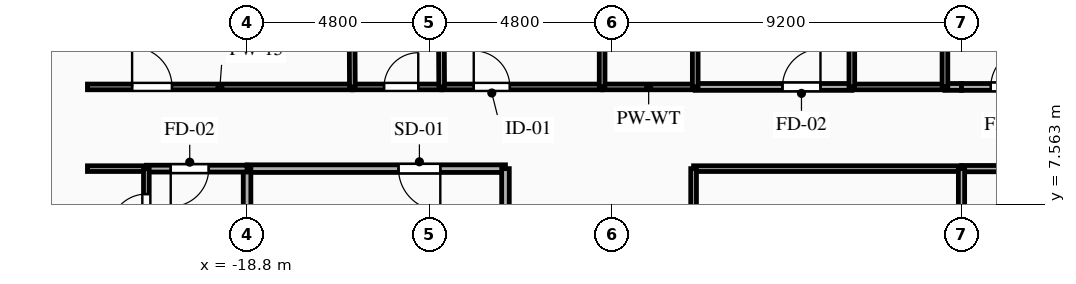
"""IFC4 building model, lengths in metres.
Left out: names, types, materials, properties, quantities, classifications, styles, units other than length and angle.
Written with IfcOpenShell. Run it as: python <this file> out.ifc"""

import sys

from ifc_helpers import new_model, si_unit, direction, frame, frame_2d, origin, place, context, subcontext, project, spatial, rectangle, extrude, element, fill, save


model = new_model("IFC4")
c1 = context("Model", 3, precision=1e-05, world=origin(), true_north=direction((0.0, 1.0)))
c2 = subcontext(c1, "Body", "Model", "MODEL_VIEW")
j1 = project(units=[si_unit("LENGTHUNIT", "METRE"), si_unit("PLANEANGLEUNIT", "RADIAN")], contexts=[c1])
p1 = place(None, origin())
s1 = spatial("IfcSite", under=j1, at=p1, CompositionType="ELEMENT")
p2 = place(p1, origin())
s2 = spatial("IfcBuilding", under=s1, at=p2, CompositionType="ELEMENT")
p3 = place(p2, frame((0.0, 0.0, 82.35)))
s3 = spatial("IfcBuildingStorey", under=s2, at=p3, CompositionType="ELEMENT", Elevation=82.35)
p4 = place(p3, frame((-12.0, 8.5, 0.0), z_axis=(0.0, 0.0, 1.0), x_axis=(-1.0, 0.0, 0.0)))
e1 = element("IfcWall", 1, at=p4, inside=s3, PredefinedType="PARTITIONING", context=c2, shape_type="SweptSolid", body=[
    extrude(rectangle(XDim=6.8, YDim=0.2, at=frame_2d((3.4, 0.0))), origin(), (0.0, 0.0, 1.0), 3.045),
])
p5 = place(p4, frame((1.715, 0.0, 0.0)))
e2 = element("IfcOpeningElement", 2, at=p5, cuts=e1, PredefinedType="OPENING", context=c2, shape_type="SweptSolid", body=[
    extrude(rectangle(XDim=1.1, YDim=2.15, at=frame_2d((0.55, 1.075))), frame((0.0, 0.11, 0.0), z_axis=(0.0, -1.0, 0.0), x_axis=(1.0, 0.0, 0.0)), (0.0, 0.0, 1.0), 0.22),
])
p6 = place(p3, frame((-12.0, 5.6, 0.0), z_axis=(0.0, 0.0, 1.0), x_axis=(0.0, 1.0, 0.0)))
e3 = element("IfcWall", 3, at=p6, inside=s3, PredefinedType="PARTITIONING", context=c2, shape_type="SweptSolid", body=[
    extrude(rectangle(XDim=2.9, YDim=0.2, at=frame_2d((1.45, 0.0))), origin(), (0.0, 0.0, 1.0), 3.045),
])
p7 = place(p3, frame((-18.8, 8.5, 0.0), z_axis=(0.0, 0.0, 1.0), x_axis=(0.0, -1.0, 0.0)))
e4 = element("IfcWall", 4, at=p7, inside=s3, PredefinedType="PARTITIONING", context=c2, shape_type="SweptSolid", body=[
    extrude(rectangle(XDim=2.9, YDim=0.2, at=frame_2d((1.45, 0.0))), origin(), (0.0, 0.0, 1.0), 2.53),
])
p8 = place(p3, frame((-18.8, 8.5, 0.0), z_axis=(0.0, 0.0, 1.0), x_axis=(-1.0, 0.0, 0.0)))
e5 = element("IfcWall", 5, at=p8, inside=s3, PredefinedType="PARTITIONING", context=c2, shape_type="SweptSolid", body=[
    extrude(rectangle(XDim=2.65, YDim=0.18, at=frame_2d((1.325, 0.0))), origin(), (0.0, 0.0, 1.0), 3.045),
])
p9 = place(p8, frame((1.009, 0.0, 0.0)))
e6 = element("IfcOpeningElement", 6, at=p9, cuts=e5, PredefinedType="OPENING", context=c2, shape_type="SweptSolid", body=[
    extrude(rectangle(XDim=1.0, YDim=2.15, at=frame_2d((0.5, 1.075))), frame((0.0, 0.1, 0.0), z_axis=(0.0, -1.0, 0.0), x_axis=(1.0, 0.0, 0.0)), (0.0, 0.0, 1.0), 0.2),
])
p10 = place(p3, frame((-21.45, 8.5, 0.0), z_axis=(0.0, 0.0, 1.0), x_axis=(-1.0, 0.0, 0.0)))
e7 = element("IfcWall", 7, at=p10, inside=s3, PredefinedType="PARTITIONING", context=c2, shape_type="SweptSolid", body=[
    extrude(rectangle(XDim=1.55, YDim=0.15, at=frame_2d((0.775, 0.0))), origin(), (0.0, 0.0, 1.0), 3.045),
])
p11 = place(p3, frame((-23.0, 10.65, 0.0), z_axis=(0.0, 0.0, 1.0), x_axis=(1.0, 0.0, 0.0)))
e8 = element("IfcWall", 8, at=p11, inside=s3, PredefinedType="PARTITIONING", context=c2, shape_type="SweptSolid", body=[
    extrude(rectangle(XDim=6.971, YDim=0.15, at=frame_2d((3.485, 0.0))), origin(), (0.0, 0.0, 1.0), 3.045),
])
p12 = place(p11, frame((1.175, 0.0, 0.0)))
e9 = element("IfcOpeningElement", 9, at=p12, cuts=e8, PredefinedType="OPENING", context=c2, shape_type="SweptSolid", body=[
    extrude(rectangle(XDim=1.05, YDim=2.15, at=frame_2d((0.525, 1.075))), frame((0.0, 0.085, 0.0), z_axis=(0.0, -1.0, 0.0), x_axis=(1.0, 0.0, 0.0)), (0.0, 0.0, 1.0), 0.17),
])
p13 = place(p3, frame((-16.029, 10.65, 0.0), z_axis=(0.0, 0.0, 1.0), x_axis=(1.0, 0.0, 0.0)))
e10 = element("IfcWall", 10, at=p13, inside=s3, PredefinedType="PLUMBINGWALL", context=c2, shape_type="SweptSolid", body=[
    extrude(rectangle(XDim=2.35, YDim=0.15, at=frame_2d((1.175, 0.0))), origin(), (0.0, 0.0, 1.0), 3.045),
])
p14 = place(p13, frame((0.834, 0.0, 0.0)))
e11 = element("IfcOpeningElement", 11, at=p14, cuts=e10, PredefinedType="OPENING", context=c2, shape_type="SweptSolid", body=[
    extrude(rectangle(XDim=0.9, YDim=2.1, at=frame_2d((0.45, 1.05))), frame((0.0, 0.085, 0.0), z_axis=(0.0, -1.0, 0.0), x_axis=(1.0, 0.0, 0.0)), (0.0, 0.0, 1.0), 0.17),
])
p15 = place(p3, frame((-13.679, 10.65, 0.0), z_axis=(0.0, 0.0, 1.0), x_axis=(1.0, 0.0, 0.0)))
e12 = element("IfcWall", 12, at=p15, inside=s3, PredefinedType="PARTITIONING", context=c2, shape_type="SweptSolid", body=[
    extrude(rectangle(XDim=4.222, YDim=0.15, at=frame_2d((2.111, 0.0))), origin(), (0.0, 0.0, 1.0), 3.045),
])
p16 = place(p15, frame((0.844, 0.0, 0.0)))
e13 = element("IfcOpeningElement", 13, at=p16, cuts=e12, PredefinedType="OPENING", context=c2, shape_type="SweptSolid", body=[
    extrude(rectangle(XDim=0.95, YDim=2.1, at=frame_2d((0.475, 1.05))), frame((0.0, 0.085, 0.0), z_axis=(0.0, -1.0, 0.0), x_axis=(1.0, 0.0, 0.0)), (0.0, 0.0, 1.0), 0.17),
])
p17 = place(p3, frame((-7.007, 10.65, 0.0), z_axis=(0.0, 0.0, 1.0), x_axis=(1.0, 0.0, 0.0)))
e14 = element("IfcWall", 14, at=p17, inside=s3, PredefinedType="PARTITIONING", context=c2, shape_type="SweptSolid", body=[
    extrude(rectangle(XDim=4.121, YDim=0.18, at=frame_2d((2.061, 0.0))), origin(), (0.0, 0.0, 1.0), 3.045),
])
p18 = place(p17, frame((2.296, 0.0, 0.0)))
e15 = element("IfcOpeningElement", 15, at=p18, cuts=e14, PredefinedType="OPENING", context=c2, shape_type="SweptSolid", body=[
    extrude(rectangle(XDim=1.0, YDim=2.15, at=frame_2d((0.5, 1.075))), frame((0.0, 0.1, 0.0), z_axis=(0.0, -1.0, 0.0), x_axis=(1.0, 0.0, 0.0)), (0.0, 0.0, 1.0), 0.2),
])
p19 = place(p3, frame((-9.457, 10.65, 0.0), z_axis=(0.0, 0.0, 1.0), x_axis=(1.0, 0.0, 0.0)))
e16 = element("IfcWall", 16, at=p19, inside=s3, PredefinedType="PLUMBINGWALL", context=c2, shape_type="SweptSolid", body=[
    extrude(rectangle(XDim=2.45, YDim=0.15, at=frame_2d((1.225, 0.0))), origin(), (0.0, 0.0, 1.0), 3.045),
])
p20 = place(p3, frame((-0.436, 10.65, 0.0), z_axis=(0.0, 0.0, 1.0), x_axis=(1.0, 0.0, 0.0)))
e17 = element("IfcWall", 17, at=p20, inside=s3, PredefinedType="PARTITIONING", context=c2, shape_type="SweptSolid", body=[
    extrude(rectangle(XDim=0.436, YDim=0.18, at=frame_2d((0.218, 0.0))), origin(), (0.0, 0.0, 1.0), 3.045),
])
p21 = place(p3, frame((-2.886, 10.65, 0.0), z_axis=(0.0, 0.0, 1.0), x_axis=(1.0, 0.0, 0.0)))
e18 = element("IfcWall", 18, at=p21, inside=s3, PredefinedType="PLUMBINGWALL", context=c2, shape_type="SweptSolid", body=[
    extrude(rectangle(XDim=2.45, YDim=0.15, at=frame_2d((1.225, 0.0))), origin(), (0.0, 0.0, 1.0), 3.045),
])
p22 = place(p3, frame((0.0, 8.5, 0.0), z_axis=(0.0, 0.0, 1.0), x_axis=(-1.0, 0.0, 0.0)))
e19 = element("IfcWall", 19, at=p22, inside=s3, PredefinedType="PARTITIONING", context=c2, shape_type="SweptSolid", body=[
    extrude(rectangle(XDim=7.05, YDim=0.15, at=frame_2d((3.525, 0.0))), origin(), (0.0, 0.0, 1.0), 3.045),
])
p23 = place(p3, frame((0.0, 10.65, 0.0), z_axis=(0.0, 0.0, 1.0), x_axis=(1.0, 0.0, 0.0)))
e20 = element("IfcWall", 20, at=p23, inside=s3, PredefinedType="PARTITIONING", context=c2, shape_type="SweptSolid", body=[
    extrude(rectangle(XDim=3.686, YDim=0.18, at=frame_2d((1.843, 0.0))), origin(), (0.0, 0.0, 1.0), 3.045),
])
p24 = place(p23, frame((0.771, 0.0, 0.0)))
e21 = element("IfcOpeningElement", 21, at=p24, cuts=e20, PredefinedType="OPENING", context=c2, shape_type="SweptSolid", body=[
    extrude(rectangle(XDim=1.0, YDim=2.15, at=frame_2d((0.5, 1.075))), frame((0.0, 0.1, 0.0), z_axis=(0.0, -1.0, 0.0), x_axis=(1.0, 0.0, 0.0)), (0.0, 0.0, 1.0), 0.2),
])
p25 = place(p3, frame((7.05, 8.5, 0.0), z_axis=(0.0, 0.0, 1.0), x_axis=(-1.0, 0.0, 0.0)))
e22 = element("IfcWall", 22, at=p25, inside=s3, PredefinedType="PARTITIONING", context=c2, shape_type="SweptSolid", body=[
    extrude(rectangle(XDim=7.05, YDim=0.165, at=frame_2d((3.525, 0.0))), origin(), (0.0, 0.0, 1.0), 3.045),
])
p26 = place(p25, frame((4.728, 0.0, 0.0)))
e23 = element("IfcOpeningElement", 23, at=p26, cuts=e22, PredefinedType="OPENING", context=c2, shape_type="SweptSolid", body=[
    extrude(rectangle(XDim=1.15, YDim=2.15, at=frame_2d((0.575, 1.075))), frame((0.0, 0.093, 0.0), z_axis=(0.0, -1.0, 0.0), x_axis=(1.0, 0.0, 0.0)), (0.0, 0.0, 1.0), 0.185),
])
p27 = place(p3, frame((-7.05, 8.5, 0.0), z_axis=(0.0, 0.0, 1.0), x_axis=(0.0, -1.0, 0.0)))
e24 = element("IfcWall", 24, at=p27, inside=s3, PredefinedType="PARTITIONING", context=c2, shape_type="SweptSolid", body=[
    extrude(rectangle(XDim=14.1, YDim=0.15, at=frame_2d((7.05, 0.0))), origin(), (0.0, 0.0, 1.0), 3.045),
])
p28 = place(p27, frame((8.011, 0.0, 0.0)))
e25 = element("IfcOpeningElement", 25, at=p28, cuts=e24, PredefinedType="OPENING", context=c2, shape_type="SweptSolid", body=[
    extrude(rectangle(XDim=1.05, YDim=2.15, at=frame_2d((0.525, 1.075))), frame((0.0, 0.085, 0.0), z_axis=(0.0, -1.0, 0.0), x_axis=(1.0, 0.0, 0.0)), (0.0, 0.0, 1.0), 0.17),
])
p29 = place(p3, frame((-21.45, 5.68, 0.0), z_axis=(0.0, 0.0, 1.0), x_axis=(0.0, 1.0, 0.0)))
e26 = element("IfcWall", 26, at=p29, inside=s3, PredefinedType="PARTITIONING", context=c2, shape_type="SweptSolid", body=[
    extrude(rectangle(XDim=2.82, YDim=0.15, at=frame_2d((1.41, 0.0))), origin(), (0.0, 0.0, 1.0), 3.045),
])
p30 = place(p29, frame((1.201, 0.0, 0.0)))
e27 = element("IfcOpeningElement", 27, at=p30, cuts=e26, PredefinedType="OPENING", context=c2, shape_type="SweptSolid", body=[
    extrude(rectangle(XDim=0.95, YDim=2.1, at=frame_2d((0.475, 1.05))), frame((0.0, 0.085, 0.0), z_axis=(0.0, -1.0, 0.0), x_axis=(1.0, 0.0, 0.0)), (0.0, 0.0, 1.0), 0.17),
])
p31 = place(p3, frame((-16.073, 18.746, 0.0), z_axis=(0.0, 0.0, 1.0), x_axis=(0.005428146808, -0.999985267503, 0.0)))
e28 = element("IfcWall", 28, at=p31, inside=s3, PredefinedType="PLUMBINGWALL", context=c2, shape_type="SweptSolid", body=[
    extrude(rectangle(XDim=8.096, YDim=0.15, at=frame_2d((4.048, 0.0))), origin(), (0.0, 0.0, 1.0), 3.045),
])
p32 = place(p3, frame((-13.723, 18.992, 0.0), z_axis=(0.0, 0.0, 1.0), x_axis=(0.005267551513, -0.999986126354, 0.0)))
e29 = element("IfcWall", 29, at=p32, inside=s3, PredefinedType="PLUMBINGWALL", context=c2, shape_type="SweptSolid", body=[
    extrude(rectangle(XDim=8.343, YDim=0.15, at=frame_2d((4.171, 0.0))), origin(), (0.0, 0.0, 1.0), 3.045),
])
for number, where, z_axis, x_axis in (
    (30, (-9.457, 12.8, 0.0), (0.0, 0.0, 1.0), (0.0, -1.0, 0.0)),
    (31, (-7.007, 10.65, 0.0), (0.0, 0.0, 1.0), (0.0, 1.0, 0.0)),
    (32, (-2.886, 12.8, 0.0), (0.0, 0.0, 1.0), (0.0, -1.0, 0.0)),
    (33, (-0.436, 10.65, 0.0), (0.0, 0.0, 1.0), (0.0, 1.0, 0.0)),
):
    element("IfcWall", number, at=place(p3, frame(where, z_axis=z_axis, x_axis=x_axis)), inside=s3, PredefinedType="PLUMBINGWALL", context=c2, shape_type="SweptSolid", body=[
        extrude(rectangle(XDim=2.15, YDim=0.15, at=frame_2d((1.075, 0.0))), origin(), (0.0, 0.0, 1.0), 3.045),
    ])
p33 = place(p3, frame((0.0, 8.5, 0.0), z_axis=(0.0, 0.0, 1.0), x_axis=(0.0, -1.0, 0.0)))
e34 = element("IfcWall", 34, at=p33, inside=s3, PredefinedType="PARTITIONING", context=c2, shape_type="SweptSolid", body=[
    extrude(rectangle(XDim=7.05, YDim=0.165, at=frame_2d((3.525, 0.0))), origin(), (0.0, 0.0, 1.0), 3.045),
])
p34 = place(p5, origin())
e35 = element("IfcDoor", 35, at=p34, inside=s3, OperationType="SINGLE_SWING_LEFT", PredefinedType="DOOR", context=c2, shape_type="SweptSolid", body=[
    extrude(rectangle(XDim=1.1, YDim=2.15, at=frame_2d((0.55, 1.075))), frame((0.0, 0.025, 0.0), z_axis=(0.0, -1.0, 0.0), x_axis=(1.0, 0.0, 0.0)), (0.0, 0.0, 1.0), 0.05),
])
fill(e2, e35)
p35 = place(p9, origin())
e36 = element("IfcDoor", 36, at=p35, inside=s3, OperationType="SINGLE_SWING_RIGHT", PredefinedType="DOOR", context=c2, shape_type="SweptSolid", body=[
    extrude(rectangle(XDim=1.0, YDim=2.15, at=frame_2d((0.5, 1.075))), frame((0.0, 0.025, 0.0), z_axis=(0.0, -1.0, 0.0), x_axis=(1.0, 0.0, 0.0)), (0.0, 0.0, 1.0), 0.05),
])
fill(e6, e36)
p36 = place(p12, origin())
e37 = element("IfcDoor", 37, at=p36, inside=s3, OperationType="SINGLE_SWING_LEFT", PredefinedType="DOOR", context=c2, shape_type="SweptSolid", body=[
    extrude(rectangle(XDim=1.05, YDim=2.15, at=frame_2d((0.525, 1.075))), frame((0.0, 0.025, 0.0), z_axis=(0.0, -1.0, 0.0), x_axis=(1.0, 0.0, 0.0)), (0.0, 0.0, 1.0), 0.05),
])
fill(e9, e37)
p37 = place(p14, origin())
e38 = element("IfcDoor", 38, at=p37, inside=s3, OperationType="SINGLE_SWING_RIGHT", PredefinedType="DOOR", context=c2, shape_type="SweptSolid", body=[
    extrude(rectangle(XDim=0.9, YDim=2.1, at=frame_2d((0.45, 1.05))), frame((0.0, 0.025, 0.0), z_axis=(0.0, -1.0, 0.0), x_axis=(1.0, 0.0, 0.0)), (0.0, 0.0, 1.0), 0.05),
])
fill(e11, e38)
p38 = place(p16, origin())
e39 = element("IfcDoor", 39, at=p38, inside=s3, OperationType="SINGLE_SWING_LEFT", PredefinedType="DOOR", context=c2, shape_type="SweptSolid", body=[
    extrude(rectangle(XDim=0.95, YDim=2.1, at=frame_2d((0.475, 1.05))), frame((0.0, 0.025, 0.0), z_axis=(0.0, -1.0, 0.0), x_axis=(1.0, 0.0, 0.0)), (0.0, 0.0, 1.0), 0.05),
])
fill(e13, e39)
p39 = place(p18, origin())
e40 = element("IfcDoor", 40, at=p39, inside=s3, OperationType="SINGLE_SWING_RIGHT", PredefinedType="DOOR", context=c2, shape_type="SweptSolid", body=[
    extrude(rectangle(XDim=1.0, YDim=2.15, at=frame_2d((0.5, 1.075))), frame((0.0, 0.025, 0.0), z_axis=(0.0, -1.0, 0.0), x_axis=(1.0, 0.0, 0.0)), (0.0, 0.0, 1.0), 0.05),
])
fill(e15, e40)
p40 = place(p24, origin())
e41 = element("IfcDoor", 41, at=p40, inside=s3, OperationType="SINGLE_SWING_RIGHT", PredefinedType="DOOR", context=c2, shape_type="SweptSolid", body=[
    extrude(rectangle(XDim=1.0, YDim=2.15, at=frame_2d((0.5, 1.075))), frame((0.0, 0.025, 0.0), z_axis=(0.0, -1.0, 0.0), x_axis=(1.0, 0.0, 0.0)), (0.0, 0.0, 1.0), 0.05),
])
fill(e21, e41)
p41 = place(p30, origin())
e42 = element("IfcDoor", 42, at=p41, inside=s3, OperationType="SINGLE_SWING_LEFT", PredefinedType="DOOR", context=c2, shape_type="SweptSolid", body=[
    extrude(rectangle(XDim=0.95, YDim=2.1, at=frame_2d((0.475, 1.05))), frame((0.0, 0.025, 0.0), z_axis=(0.0, -1.0, 0.0), x_axis=(1.0, 0.0, 0.0)), (0.0, 0.0, 1.0), 0.05),
])
fill(e27, e42)
save(model, sys.argv[1])
